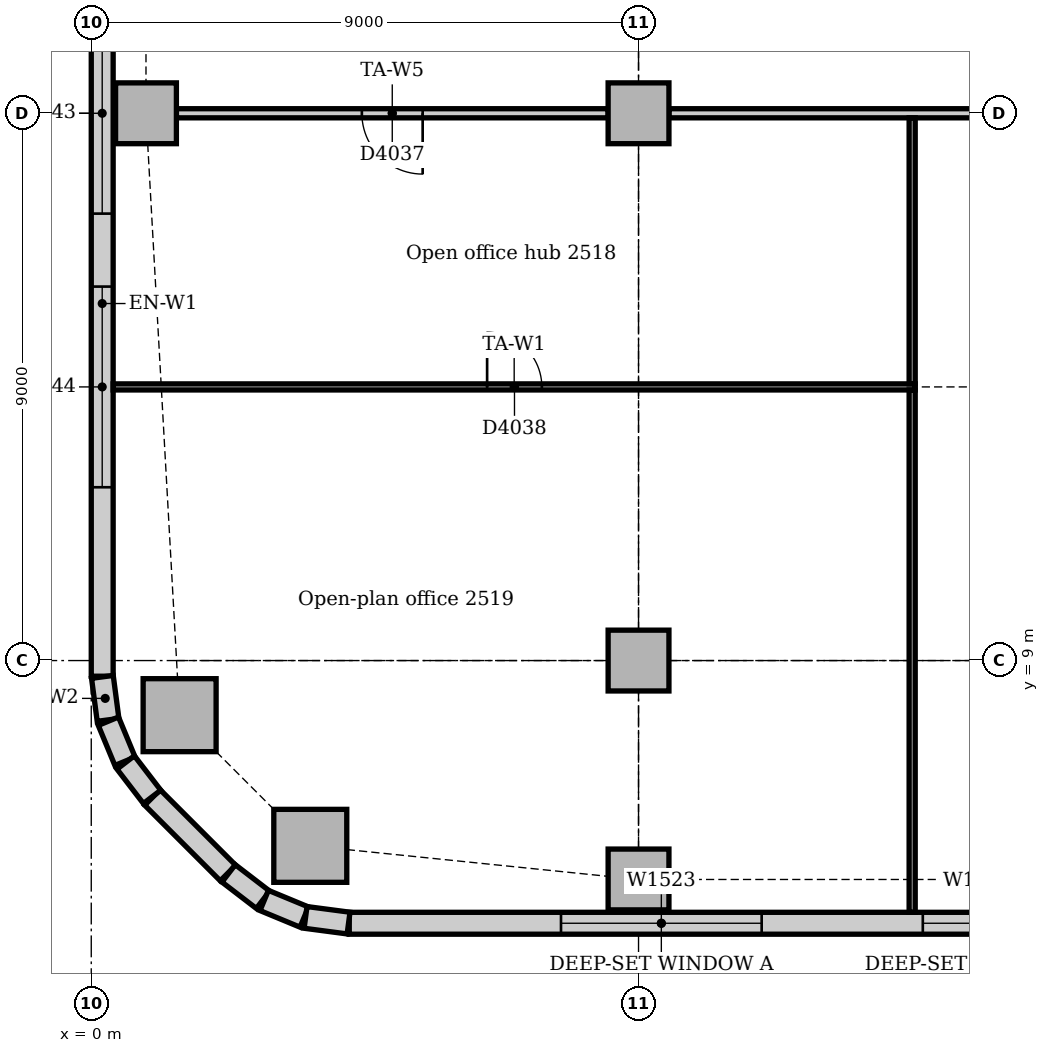
"""IFC4 building model, lengths in metres.
Left out: names, types, materials, properties, quantities, classifications, styles, units other than length and angle.
Written with IfcOpenShell. Run it as: python <this file> out.ifc"""

import sys

from ifc_helpers import new_model, si_unit, direction, frame, frame_2d, origin, origin_2d, place, context, subcontext, project, spatial, rectangle, extrude, element, fill, save


model = new_model("IFC4")
c1 = context("Model", 3, precision=1e-05, world=origin(), true_north=direction((0.0, 1.0)))
c2 = subcontext(c1, "Body", "Model", "MODEL_VIEW")
j1 = project(units=[si_unit("LENGTHUNIT", "METRE"), si_unit("PLANEANGLEUNIT", "RADIAN")], contexts=[c1])
p1 = place(None, origin())
s1 = spatial("IfcSite", under=j1, at=p1, CompositionType="ELEMENT")
p2 = place(p1, origin())
s2 = spatial("IfcBuilding", under=s1, at=p2, CompositionType="ELEMENT")
p3 = place(p2, frame((0.0, 0.0, 108.0)))
s3 = spatial("IfcBuildingStorey", under=s2, at=p3, CompositionType="ELEMENT", Elevation=108.0)
for number, where, z_axis, x_axis in (
    (1, (3.602, 5.953, 0.0), (0.0, 0.0, 1.0), (1.0, 0.0, 0.0)),
    (2, (1.453, 8.102, 0.0), (0.0, 0.0, 1.0), (1.0, 0.0, 0.0)),
):
    element("IfcColumn", number, at=place(p3, frame(where, z_axis=z_axis, x_axis=x_axis)), inside=s3, PredefinedType="COLUMN", context=c2, shape_type="SweptSolid", body=[
        extrude(rectangle(XDim=1.2, YDim=1.2, at=origin_2d()), origin(), (0.0, 0.0, 1.0), 3.85),
    ])
for number, where, z_axis, x_axis in (
    (3, (9.0, 5.4, 0.0), (0.0, 0.0, 1.0), (1.0, 0.0, 0.0)),
    (4, (0.9, 18.0, 0.0), (0.0, 0.0, 1.0), (1.0, 0.0, 0.0)),
    (5, (9.0, 9.0, 0.0), (0.0, 0.0, 1.0), (1.0, 0.0, 0.0)),
    (6, (9.0, 18.0, 0.0), (0.0, 0.0, 1.0), (1.0, 0.0, 0.0)),
):
    element("IfcColumn", number, at=place(p3, frame(where, z_axis=z_axis, x_axis=x_axis)), inside=s3, PredefinedType="COLUMN", context=c2, shape_type="SweptSolid", body=[
        extrude(rectangle(XDim=1.0, YDim=1.0, at=origin_2d()), origin(), (0.0, 0.0, 1.0), 3.85),
    ])
p4 = place(p3, frame((4.243, 4.68, 0.0), z_axis=(0.0, 0.0, 1.0), x_axis=(1.0, 0.0, 0.0)))
e7 = element("IfcWall", 7, at=p4, inside=s3, PredefinedType="STANDARD", context=c2, shape_type="SweptSolid", body=[
    extrude(rectangle(XDim=37.265, YDim=0.36, at=frame_2d((18.632, 0.0))), origin(), (0.0, 0.0, 1.0), 3.85),
])
p5 = place(p4, frame((3.482, 0.0, 0.9)))
e8 = element("IfcOpeningElement", 8, at=p5, cuts=e7, PredefinedType="OPENING", context=c2, shape_type="SweptSolid", body=[
    extrude(rectangle(XDim=3.3, YDim=1.6, at=frame_2d((1.65, 0.8))), frame((0.0, 0.19, 0.0), z_axis=(0.0, -1.0, 0.0), x_axis=(1.0, 0.0, 0.0)), (0.0, 0.0, 1.0), 0.38),
])
p6 = place(p4, frame((9.432, 0.0, 0.9)))
e9 = element("IfcOpeningElement", 9, at=p6, cuts=e7, PredefinedType="OPENING", context=c2, shape_type="SweptSolid", body=[
    extrude(rectangle(XDim=1.8, YDim=1.6, at=frame_2d((0.9, 0.8))), frame((0.0, 0.19, 0.0), z_axis=(0.0, -1.0, 0.0), x_axis=(1.0, 0.0, 0.0)), (0.0, 0.0, 1.0), 0.38),
])
p7 = place(p4, frame((12.482, 0.0, 0.9)))
e10 = element("IfcOpeningElement", 10, at=p7, cuts=e7, PredefinedType="OPENING", context=c2, shape_type="SweptSolid", body=[
    extrude(rectangle(XDim=3.3, YDim=1.6, at=frame_2d((1.65, 0.8))), frame((0.0, 0.19, 0.0), z_axis=(0.0, -1.0, 0.0), x_axis=(1.0, 0.0, 0.0)), (0.0, 0.0, 1.0), 0.38),
])
p8 = place(p4, frame((16.982, 0.0, 0.9)))
e11 = element("IfcOpeningElement", 11, at=p8, cuts=e7, PredefinedType="OPENING", context=c2, shape_type="SweptSolid", body=[
    extrude(rectangle(XDim=3.3, YDim=1.6, at=frame_2d((1.65, 0.8))), frame((0.0, 0.19, 0.0), z_axis=(0.0, -1.0, 0.0), x_axis=(1.0, 0.0, 0.0)), (0.0, 0.0, 1.0), 0.38),
])
p9 = place(p4, frame((21.482, 0.0, 0.9)))
e12 = element("IfcOpeningElement", 12, at=p9, cuts=e7, PredefinedType="OPENING", context=c2, shape_type="SweptSolid", body=[
    extrude(rectangle(XDim=3.3, YDim=1.6, at=frame_2d((1.65, 0.8))), frame((0.0, 0.19, 0.0), z_axis=(0.0, -1.0, 0.0), x_axis=(1.0, 0.0, 0.0)), (0.0, 0.0, 1.0), 0.38),
])
p10 = place(p4, frame((25.982, 0.0, 0.9)))
e13 = element("IfcOpeningElement", 13, at=p10, cuts=e7, PredefinedType="OPENING", context=c2, shape_type="SweptSolid", body=[
    extrude(rectangle(XDim=3.3, YDim=1.6, at=frame_2d((1.65, 0.8))), frame((0.0, 0.19, 0.0), z_axis=(0.0, -1.0, 0.0), x_axis=(1.0, 0.0, 0.0)), (0.0, 0.0, 1.0), 0.38),
])
p11 = place(p4, frame((30.482, 0.0, 0.9)))
e14 = element("IfcOpeningElement", 14, at=p11, cuts=e7, PredefinedType="OPENING", context=c2, shape_type="SweptSolid", body=[
    extrude(rectangle(XDim=3.3, YDim=1.6, at=frame_2d((1.65, 0.8))), frame((0.0, 0.19, 0.0), z_axis=(0.0, -1.0, 0.0), x_axis=(1.0, 0.0, 0.0)), (0.0, 0.0, 1.0), 0.38),
])
p12 = place(p3, frame((0.18, 21.0, 0.0), z_axis=(0.0, 0.0, 1.0), x_axis=(0.0, -1.0, 0.0)))
e15 = element("IfcWall", 15, at=p12, inside=s3, PredefinedType="STANDARD", context=c2, shape_type="SweptSolid", body=[
    extrude(rectangle(XDim=12.257, YDim=0.36, at=frame_2d((6.129, 0.0))), origin(), (0.0, 0.0, 1.0), 3.85),
])
p13 = place(p12, frame((1.35, 0.0, 0.9)))
e16 = element("IfcOpeningElement", 16, at=p13, cuts=e15, PredefinedType="OPENING", context=c2, shape_type="SweptSolid", body=[
    extrude(rectangle(XDim=3.3, YDim=1.6, at=frame_2d((1.65, 0.8))), frame((0.0, 0.19, 0.0), z_axis=(0.0, -1.0, 0.0), x_axis=(1.0, 0.0, 0.0)), (0.0, 0.0, 1.0), 0.38),
])
p14 = place(p12, frame((5.85, 0.0, 0.9)))
e17 = element("IfcOpeningElement", 17, at=p14, cuts=e15, PredefinedType="OPENING", context=c2, shape_type="SweptSolid", body=[
    extrude(rectangle(XDim=3.3, YDim=1.6, at=frame_2d((1.65, 0.8))), frame((0.0, 0.19, 0.0), z_axis=(0.0, -1.0, 0.0), x_axis=(1.0, 0.0, 0.0)), (0.0, 0.0, 1.0), 0.38),
])
p15 = place(p3, frame((1.006, 6.749, 0.0), z_axis=(0.0, 0.0, 1.0), x_axis=(0.707106781187, -0.707106781187, 0.0)))
e18 = element("IfcWall", 18, at=p15, inside=s3, PredefinedType="STANDARD", context=c2, shape_type="SweptSolid", body=[
    extrude(rectangle(XDim=1.757, YDim=0.36, at=frame_2d((0.879, 0.0))), origin(), (0.0, 0.0, 1.0), 3.85),
])
for number, where, z_axis, x_axis in (
    (19, (0.183, 8.731, 0.0), (0.0, 0.0, 1.0), (0.131, -0.991, 0.0)),
    (20, (0.282, 8.003, 0.0), (0.0, 0.0, 1.0), (0.383, -0.924, 0.0)),
):
    element("IfcWall", number, at=place(p3, frame(where, z_axis=z_axis, x_axis=x_axis)), inside=s3, PredefinedType="STANDARD", context=c2, shape_type="SweptSolid", body=[
        extrude(rectangle(XDim=0.713, YDim=0.36, at=frame_2d((0.356, 0.0))), origin(), (0.0, 0.0, 1.0), 3.85),
    ])
for number, where, z_axis, x_axis in (
    (21, (0.566, 7.324, 0.0), (0.0, 0.0, 1.0), (0.609, -0.793, 0.0)),
    (22, (2.259, 5.5, 0.0), (0.0, 0.0, 1.0), (0.793, -0.609, 0.0)),
):
    element("IfcWall", number, at=place(p3, frame(where, z_axis=z_axis, x_axis=x_axis)), inside=s3, PredefinedType="STANDARD", context=c2, shape_type="SweptSolid", body=[
        extrude(rectangle(XDim=0.713, YDim=0.36, at=frame_2d((0.357, 0.0))), origin(), (0.0, 0.0, 1.0), 3.85),
    ])
for number, where, z_axis, x_axis in (
    (23, (2.844, 5.055, 0.0), (0.0, 0.0, 1.0), (0.924, -0.383, 0.0)),
    (24, (3.524, 4.776, 0.0), (0.0, 0.0, 1.0), (0.991, -0.131, 0.0)),
):
    element("IfcWall", number, at=place(p3, frame(where, z_axis=z_axis, x_axis=x_axis)), inside=s3, PredefinedType="STANDARD", context=c2, shape_type="SweptSolid", body=[
        extrude(rectangle(XDim=0.713, YDim=0.36, at=frame_2d((0.356, 0.0))), origin(), (0.0, 0.0, 1.0), 3.85),
    ])
p16 = place(p3, frame((9.5, 18.0, 0.0), z_axis=(0.0, 0.0, 1.0), x_axis=(1.0, 0.0, 0.0)))
e25 = element("IfcWall", 25, at=p16, inside=s3, PredefinedType="PARTITIONING", context=c2, shape_type="SweptSolid", body=[
    extrude(rectangle(XDim=8.0, YDim=0.15, at=frame_2d((4.0, 0.0))), origin(), (0.0, 0.0, 1.0), 3.158),
])
p17 = place(p3, frame((1.4, 18.0, 0.0), z_axis=(0.0, 0.0, 1.0), x_axis=(1.0, 0.0, 0.0)))
e26 = element("IfcWall", 26, at=p17, inside=s3, PredefinedType="PARTITIONING", context=c2, shape_type="SweptSolid", body=[
    extrude(rectangle(XDim=7.1, YDim=0.15, at=frame_2d((3.55, 0.0))), origin(), (0.0, 0.0, 1.0), 3.158),
])
p18 = place(p17, frame((3.05, 0.0, 0.0)))
e27 = element("IfcOpeningElement", 27, at=p18, cuts=e26, PredefinedType="OPENING", context=c2, shape_type="SweptSolid", body=[
    extrude(rectangle(XDim=1.0, YDim=2.1, at=frame_2d((0.5, 1.05))), frame((0.0, 0.085, 0.0), z_axis=(0.0, -1.0, 0.0), x_axis=(1.0, 0.0, 0.0)), (0.0, 0.0, 1.0), 0.17),
])
p19 = place(p3, frame((0.36, 13.5, 0.0), z_axis=(0.0, 0.0, 1.0), x_axis=(1.0, 0.0, 0.0)))
e28 = element("IfcWall", 28, at=p19, inside=s3, PredefinedType="PARTITIONING", context=c2, shape_type="SweptSolid", body=[
    extrude(rectangle(XDim=13.19, YDim=0.1, at=frame_2d((6.595, 0.0))), origin(), (0.0, 0.0, 1.0), 3.354),
])
p20 = place(p19, frame((6.15, 0.0, 0.0)))
e29 = element("IfcOpeningElement", 29, at=p20, cuts=e28, PredefinedType="OPENING", context=c2, shape_type="SweptSolid", body=[
    extrude(rectangle(XDim=0.9, YDim=2.1, at=frame_2d((0.45, 1.05))), frame((0.0, 0.06, 0.0), z_axis=(0.0, -1.0, 0.0), x_axis=(1.0, 0.0, 0.0)), (0.0, 0.0, 1.0), 0.12),
])
p21 = place(p3, frame((13.5, 13.55, 0.0), z_axis=(0.0, 0.0, 1.0), x_axis=(0.0, 1.0, 0.0)))
e30 = element("IfcWall", 30, at=p21, inside=s3, PredefinedType="PARTITIONING", context=c2, shape_type="SweptSolid", body=[
    extrude(rectangle(XDim=4.375, YDim=0.1, at=frame_2d((2.188, 0.0))), origin(), (0.0, 0.0, 1.0), 3.85),
])
p22 = place(p3, frame((13.5, 4.86, 0.0), z_axis=(0.0, 0.0, 1.0), x_axis=(0.0, 1.0, 0.0)))
e31 = element("IfcWall", 31, at=p22, inside=s3, PredefinedType="PARTITIONING", context=c2, shape_type="SweptSolid", body=[
    extrude(rectangle(XDim=8.59, YDim=0.1, at=frame_2d((4.295, 0.0))), origin(), (0.0, 0.0, 1.0), 3.85),
])
p23 = place(p5, origin())
e32 = element("IfcWindow", 32, at=p23, inside=s3, PartitioningType="SINGLE_PANEL", PredefinedType="WINDOW", context=c2, shape_type="SweptSolid", body=[
    extrude(rectangle(XDim=3.3, YDim=1.6, at=frame_2d((1.65, 0.8))), frame((0.0, 0.13, 0.0), z_axis=(0.0, -1.0, 0.0), x_axis=(1.0, 0.0, 0.0)), (0.0, 0.0, 1.0), 0.06),
])
fill(e8, e32)
p24 = place(p6, origin())
e33 = element("IfcWindow", 33, at=p24, inside=s3, PartitioningType="SINGLE_PANEL", PredefinedType="WINDOW", context=c2, shape_type="SweptSolid", body=[
    extrude(rectangle(XDim=1.8, YDim=1.6, at=frame_2d((0.9, 0.8))), frame((0.0, 0.13, 0.0), z_axis=(0.0, -1.0, 0.0), x_axis=(1.0, 0.0, 0.0)), (0.0, 0.0, 1.0), 0.06),
])
fill(e9, e33)
p25 = place(p13, origin())
e34 = element("IfcWindow", 34, at=p25, inside=s3, PartitioningType="SINGLE_PANEL", PredefinedType="WINDOW", context=c2, shape_type="SweptSolid", body=[
    extrude(rectangle(XDim=3.3, YDim=1.6, at=frame_2d((1.65, 0.8))), frame((0.0, 0.13, 0.0), z_axis=(0.0, -1.0, 0.0), x_axis=(1.0, 0.0, 0.0)), (0.0, 0.0, 1.0), 0.06),
])
fill(e16, e34)
p26 = place(p14, origin())
e35 = element("IfcWindow", 35, at=p26, inside=s3, PartitioningType="SINGLE_PANEL", PredefinedType="WINDOW", context=c2, shape_type="SweptSolid", body=[
    extrude(rectangle(XDim=3.3, YDim=1.6, at=frame_2d((1.65, 0.8))), frame((0.0, 0.13, 0.0), z_axis=(0.0, -1.0, 0.0), x_axis=(1.0, 0.0, 0.0)), (0.0, 0.0, 1.0), 0.06),
])
fill(e17, e35)
p27 = place(p18, frame((1.0, 0.0, 0.0), z_axis=(0.0, 0.0, 1.0), x_axis=(-1.0, 0.0, 0.0)))
e36 = element("IfcDoor", 36, at=p27, inside=s3, OperationType="SINGLE_SWING_LEFT", PredefinedType="DOOR", context=c2, shape_type="SweptSolid", body=[
    extrude(rectangle(XDim=1.0, YDim=2.1, at=frame_2d((0.5, 1.05))), frame((0.0, 0.025, 0.0), z_axis=(0.0, -1.0, 0.0), x_axis=(1.0, 0.0, 0.0)), (0.0, 0.0, 1.0), 0.05),
])
fill(e27, e36)
p28 = place(p20, origin())
e37 = element("IfcDoor", 37, at=p28, inside=s3, OperationType="SINGLE_SWING_LEFT", PredefinedType="DOOR", context=c2, shape_type="SweptSolid", body=[
    extrude(rectangle(XDim=0.9, YDim=2.1, at=frame_2d((0.45, 1.05))), frame((0.0, 0.025, 0.0), z_axis=(0.0, -1.0, 0.0), x_axis=(1.0, 0.0, 0.0)), (0.0, 0.0, 1.0), 0.05),
])
fill(e29, e37)
save(model, sys.argv[1])
